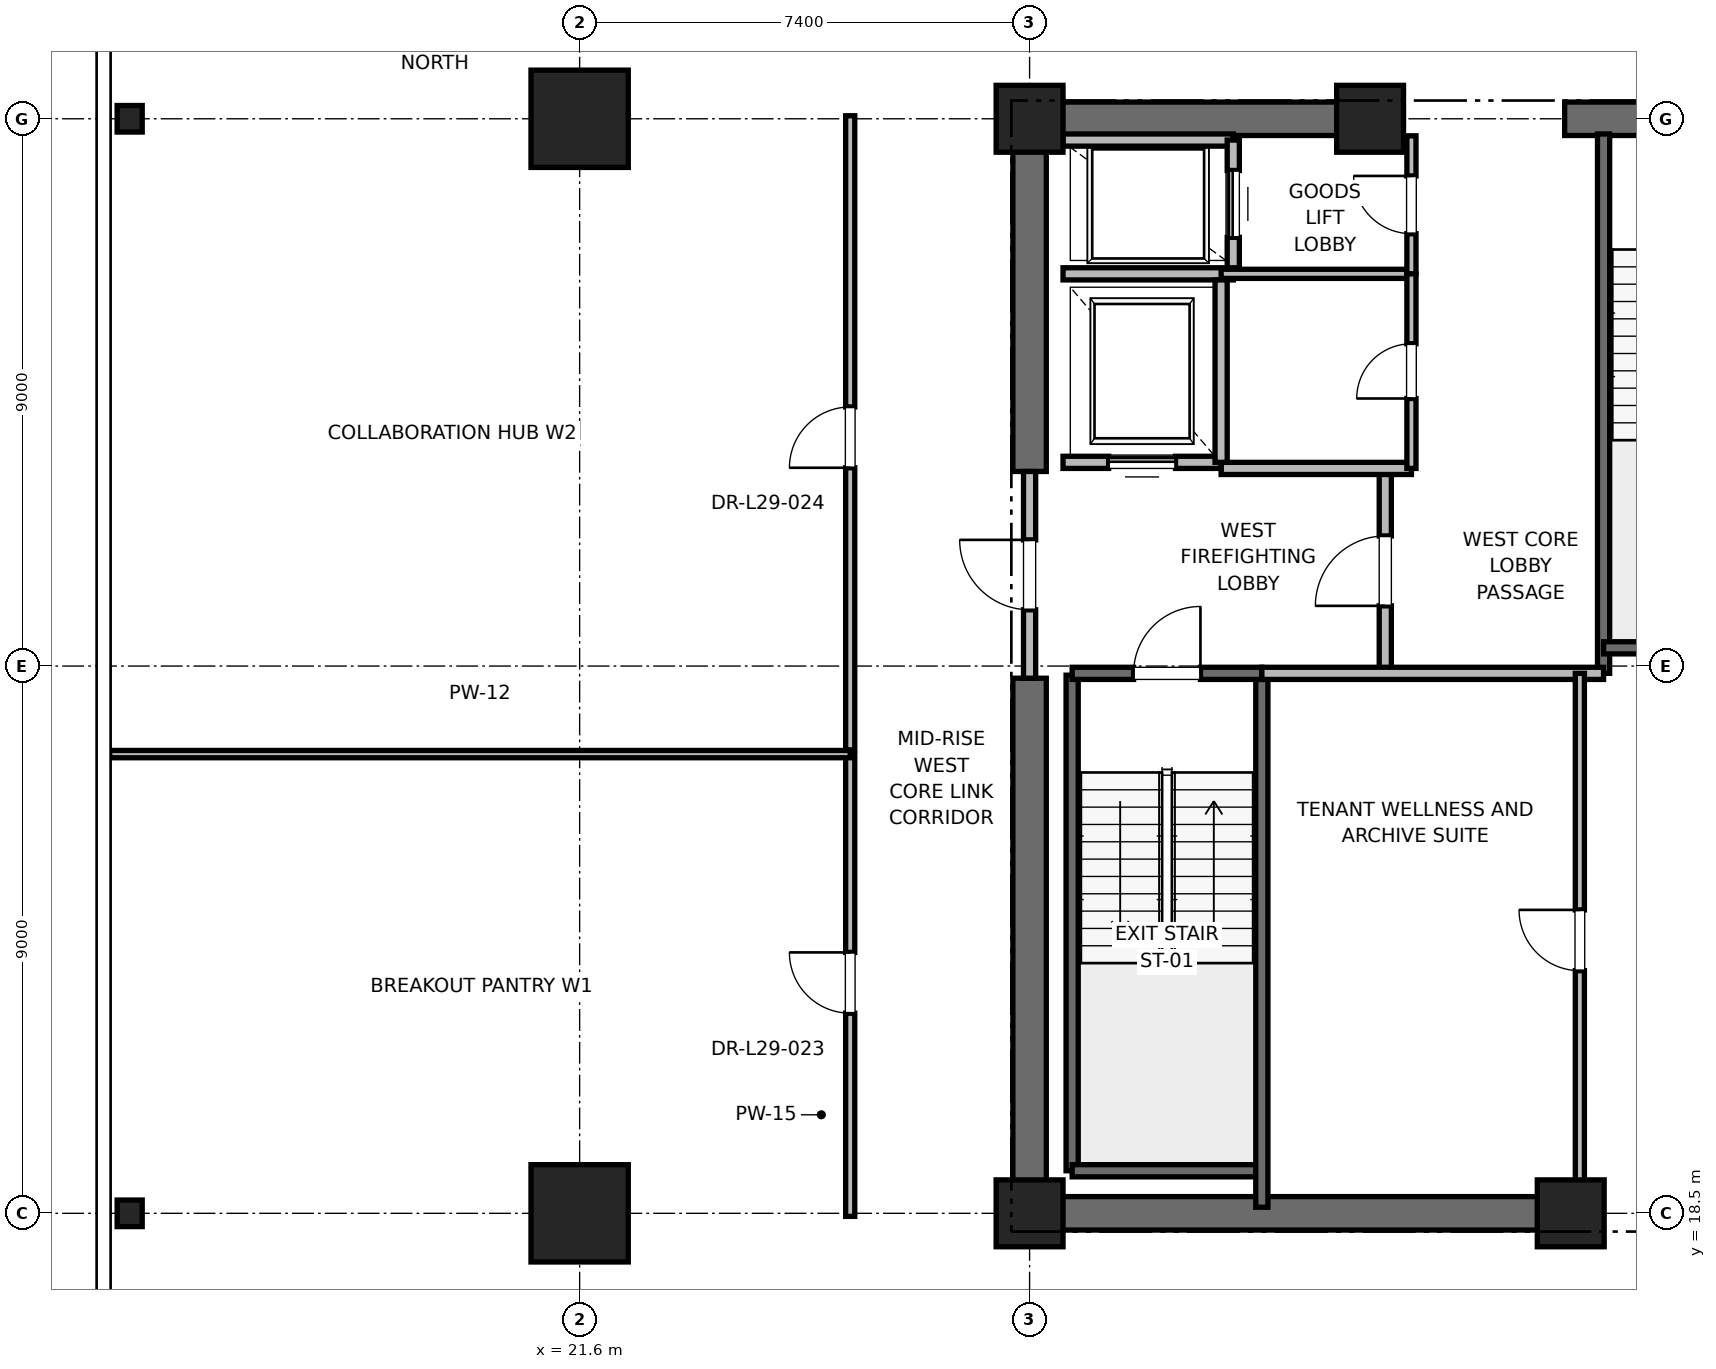
"""IFC4 building model, lengths in metres.
Left out: names, types, materials, properties, quantities, classifications, styles, units other than length and angle.
Written with IfcOpenShell. Run it as: python <this file> out.ifc"""

import sys

from ifc_helpers import new_model, si_unit, direction, frame, frame_2d, origin, origin_2d, place, context, subcontext, project, spatial, rectangle, i_section, extrude, element, fill, save


model = new_model("IFC4")
c1 = context("Model", 3, precision=1e-05, world=origin(), true_north=direction((0.0, 1.0)))
c2 = subcontext(c1, "Body", "Model", "MODEL_VIEW")
j1 = project(units=[si_unit("LENGTHUNIT", "METRE"), si_unit("PLANEANGLEUNIT", "RADIAN")], contexts=[c1])
p1 = place(None, origin())
s1 = spatial("IfcSite", under=j1, at=p1, CompositionType="ELEMENT")
p2 = place(p1, origin())
s2 = spatial("IfcBuilding", under=s1, at=p2, CompositionType="ELEMENT")
p3 = place(p2, frame((0.0, 0.0, 128.4)))
s3 = spatial("IfcBuildingStorey", under=s2, at=p3, CompositionType="ELEMENT", Elevation=128.4)
for number, where, z_axis, x_axis in (
    (1, (21.6, 18.5, 0.0), (0.0, 0.0, 1.0), (1.0, 0.0, 0.0)),
    (2, (21.6, 36.5, 0.0), (0.0, 0.0, 1.0), (1.0, 0.0, 0.0)),
):
    element("IfcColumn", number, at=place(p3, frame(where, z_axis=z_axis, x_axis=x_axis)), inside=s3, PredefinedType="COLUMN", context=c2, shape_type="SweptSolid", body=[
        extrude(rectangle(XDim=1.6, YDim=1.6, at=origin_2d()), origin(), (0.0, 0.0, 1.0), 4.0),
    ])
for number, where, z_axis, x_axis in (
    (3, (14.2, 18.5, 0.0), (0.0, 0.0, 1.0), (1.0, 0.0, 0.0)),
    (4, (14.2, 36.5, 0.0), (0.0, 0.0, 1.0), (1.0, 0.0, 0.0)),
):
    element("IfcColumn", number, at=place(p3, frame(where, z_axis=z_axis, x_axis=x_axis)), inside=s3, PredefinedType="COLUMN", context=c2, shape_type="SweptSolid", body=[
        extrude(i_section(OverallWidth=0.412, OverallDepth=0.437, WebThickness=0.036, FlangeThickness=0.058, FilletRadius=0.015, at=origin_2d()), origin(), (0.0, 0.0, 1.0), 4.0),
    ])
for number, where, z_axis, x_axis in (
    (5, (29.0, 18.5, 0.0), (0.0, 0.0, 1.0), (1.0, 0.0, 0.0)),
    (6, (29.0, 36.5, 0.0), (0.0, 0.0, 1.0), (1.0, 0.0, 0.0)),
    (7, (37.9, 18.5, 0.0), (0.0, 0.0, 1.0), (1.0, 0.0, 0.0)),
    (8, (34.6, 36.5, 0.0), (0.0, 0.0, 1.0), (1.0, 0.0, 0.0)),
):
    element("IfcColumn", number, at=place(p3, frame(where, z_axis=z_axis, x_axis=x_axis)), inside=s3, PredefinedType="PILASTER", context=c2, shape_type="SweptSolid", body=[
        extrude(rectangle(XDim=1.1, YDim=1.1, at=origin_2d()), origin(), (0.0, 0.0, 1.0), 4.0),
    ])
p4 = place(p3, frame((29.0, 18.5, 0.0), z_axis=(0.0, 0.0, 1.0), x_axis=(1.0, 0.0, 0.0)))
e9 = element("IfcWall", 9, at=p4, inside=s3, PredefinedType="SHEAR", context=c2, shape_type="SweptSolid", body=[
    extrude(rectangle(XDim=9.2, YDim=0.55, at=frame_2d((4.6, 0.0))), origin(), (0.0, 0.0, 1.0), 3.775),
])
p5 = place(p3, frame((29.0, 36.5, 0.0), z_axis=(0.0, 0.0, 1.0), x_axis=(1.0, 0.0, 0.0)))
e10 = element("IfcWall", 10, at=p5, inside=s3, PredefinedType="SHEAR", context=c2, shape_type="SweptSolid", body=[
    extrude(rectangle(XDim=5.8, YDim=0.55, at=frame_2d((2.9, 0.0))), origin(), (0.0, 0.0, 1.0), 3.775),
])
p6 = place(p3, frame((37.8, 36.5, 0.0), z_axis=(0.0, 0.0, 1.0), x_axis=(1.0, 0.0, 0.0)))
e11 = element("IfcWall", 11, at=p6, inside=s3, PredefinedType="SHEAR", context=c2, shape_type="SweptSolid", body=[
    extrude(rectangle(XDim=4.4, YDim=0.55, at=frame_2d((2.2, 0.0))), origin(), (0.0, 0.0, 1.0), 3.775),
])
p7 = place(p6, frame((1.65, 0.0, 0.0)))
e12 = element("IfcOpeningElement", 12, at=p7, cuts=e11, PredefinedType="OPENING", context=c2, shape_type="SweptSolid", body=[
    extrude(rectangle(XDim=1.1, YDim=2.15, at=frame_2d((0.55, 1.075))), frame((0.0, 0.275, 0.0), z_axis=(0.0, -1.0, 0.0), x_axis=(1.0, 0.0, 0.0)), (0.0, 0.0, 1.0), 0.55),
])
p8 = place(p3, frame((29.0, 18.5, 0.0), z_axis=(0.0, 0.0, 1.0), x_axis=(0.0, 1.0, 0.0)))
e13 = element("IfcWall", 13, at=p8, inside=s3, PredefinedType="SHEAR", context=c2, shape_type="SweptSolid", body=[
    extrude(rectangle(XDim=8.8, YDim=0.55, at=frame_2d((4.4, 0.0))), origin(), (0.0, 0.0, 1.0), 3.775),
])
p9 = place(p3, frame((29.0, 30.7, 0.0), z_axis=(0.0, 0.0, 1.0), x_axis=(0.0, 1.0, 0.0)))
e14 = element("IfcWall", 14, at=p9, inside=s3, PredefinedType="SHEAR", context=c2, shape_type="SweptSolid", body=[
    extrude(rectangle(XDim=5.8, YDim=0.55, at=frame_2d((2.9, 0.0))), origin(), (0.0, 0.0, 1.0), 3.775),
])
p10 = place(p3, frame((29.7, 19.2, 0.0), z_axis=(0.0, 0.0, 1.0), x_axis=(0.0, 1.0, 0.0)))
e15 = element("IfcWall", 15, at=p10, inside=s3, PredefinedType="SOLIDWALL", context=c2, shape_type="SweptSolid", body=[
    extrude(rectangle(XDim=8.15, YDim=0.2, at=frame_2d((4.075, 0.0))), origin(), (0.0, 0.0, 1.0), 3.775),
])
p11 = place(p3, frame((29.7, 19.2, 0.0), z_axis=(0.0, 0.0, 1.0), x_axis=(1.0, 0.0, 0.0)))
e16 = element("IfcWall", 16, at=p11, inside=s3, PredefinedType="SOLIDWALL", context=c2, shape_type="SweptSolid", body=[
    extrude(rectangle(XDim=3.12, YDim=0.2, at=frame_2d((1.56, 0.0))), origin(), (0.0, 0.0, 1.0), 3.775),
])
p12 = place(p3, frame((32.82, 18.6, 0.0), z_axis=(0.0, 0.0, 1.0), x_axis=(0.0, 1.0, 0.0)))
e17 = element("IfcWall", 17, at=p12, inside=s3, PredefinedType="SOLIDWALL", context=c2, shape_type="SweptSolid", body=[
    extrude(rectangle(XDim=8.78, YDim=0.2, at=frame_2d((4.39, 0.0))), origin(), (0.0, 0.0, 1.0), 3.775),
])
p13 = place(p3, frame((29.7, 27.38, 0.0), z_axis=(0.0, 0.0, 1.0), x_axis=(1.0, 0.0, 0.0)))
e18 = element("IfcWall", 18, at=p13, inside=s3, PredefinedType="SOLIDWALL", context=c2, shape_type="SweptSolid", body=[
    extrude(rectangle(XDim=3.12, YDim=0.2, at=frame_2d((1.56, 0.0))), origin(), (0.0, 0.0, 1.0), 3.775),
])
p14 = place(p13, frame((1.01, 0.0, 0.0)))
e19 = element("IfcOpeningElement", 19, at=p14, cuts=e18, PredefinedType="OPENING", context=c2, shape_type="SweptSolid", body=[
    extrude(rectangle(XDim=1.1, YDim=2.15, at=frame_2d((0.55, 1.075))), frame((0.0, 0.1, 0.0), z_axis=(0.0, -1.0, 0.0), x_axis=(1.0, 0.0, 0.0)), (0.0, 0.0, 1.0), 0.2),
])
p15 = place(p3, frame((38.44, 27.38, 0.0), z_axis=(0.0, 0.0, 1.0), x_axis=(0.0, 1.0, 0.0)))
e20 = element("IfcWall", 20, at=p15, inside=s3, PredefinedType="SOLIDWALL", context=c2, shape_type="SweptSolid", body=[
    extrude(rectangle(XDim=8.87, YDim=0.2, at=frame_2d((4.435, 0.0))), origin(), (0.0, 0.0, 1.0), 3.775),
])
p16 = place(p3, frame((38.44, 27.8, 0.0), z_axis=(0.0, 0.0, 1.0), x_axis=(1.0, 0.0, 0.0)))
e21 = element("IfcWall", 21, at=p16, inside=s3, PredefinedType="SOLIDWALL", context=c2, shape_type="SweptSolid", body=[
    extrude(rectangle(XDim=3.32, YDim=0.2, at=frame_2d((1.66, 0.0))), origin(), (0.0, 0.0, 1.0), 3.775),
])
p17 = place(p3, frame((34.85, 27.38, 0.0), z_axis=(0.0, 0.0, 1.0), x_axis=(0.0, 1.0, 0.0)))
e22 = element("IfcWall", 22, at=p17, inside=s3, PredefinedType="PARTITIONING", context=c2, shape_type="SweptSolid", body=[
    extrude(rectangle(XDim=3.37, YDim=0.2, at=frame_2d((1.685, 0.0))), origin(), (0.0, 0.0, 1.0), 3.775),
])
p18 = place(p17, frame((1.11, 0.0, 0.0)))
e23 = element("IfcOpeningElement", 23, at=p18, cuts=e22, PredefinedType="OPENING", context=c2, shape_type="SweptSolid", body=[
    extrude(rectangle(XDim=1.15, YDim=2.2, at=frame_2d((0.575, 1.1))), frame((0.0, 0.1, 0.0), z_axis=(0.0, -1.0, 0.0), x_axis=(1.0, 0.0, 0.0)), (0.0, 0.0, 1.0), 0.2),
])
p19 = place(p3, frame((29.0, 27.3, 0.0), z_axis=(0.0, 0.0, 1.0), x_axis=(0.0, 1.0, 0.0)))
e24 = element("IfcWall", 24, at=p19, inside=s3, PredefinedType="PARTITIONING", context=c2, shape_type="SweptSolid", body=[
    extrude(rectangle(XDim=3.4, YDim=0.2, at=frame_2d((1.7, 0.0))), origin(), (0.0, 0.0, 1.0), 2.755),
])
p20 = place(p19, frame((1.125, 0.0, 0.0)))
e25 = element("IfcOpeningElement", 25, at=p20, cuts=e24, PredefinedType="OPENING", context=c2, shape_type="SweptSolid", body=[
    extrude(rectangle(XDim=1.15, YDim=2.2, at=frame_2d((0.575, 1.1))), frame((0.0, 0.1, 0.0), z_axis=(0.0, -1.0, 0.0), x_axis=(1.0, 0.0, 0.0)), (0.0, 0.0, 1.0), 0.2),
])
p21 = place(p3, frame((32.82, 27.38, 0.0), z_axis=(0.0, 0.0, 1.0), x_axis=(1.0, 0.0, 0.0)))
e26 = element("IfcWall", 26, at=p21, inside=s3, PredefinedType="PARTITIONING", context=c2, shape_type="SweptSolid", body=[
    extrude(rectangle(XDim=5.62, YDim=0.2, at=frame_2d((2.81, 0.0))), origin(), (0.0, 0.0, 1.0), 3.775),
])
p22 = place(p3, frame((32.15, 30.75, 0.0), z_axis=(0.0, 0.0, 1.0), x_axis=(1.0, 0.0, 0.0)))
e27 = element("IfcWall", 27, at=p22, inside=s3, PredefinedType="PARTITIONING", context=c2, shape_type="SweptSolid", body=[
    extrude(rectangle(XDim=3.13, YDim=0.2, at=frame_2d((1.565, 0.0))), origin(), (0.0, 0.0, 1.0), 3.775),
])
p23 = place(p3, frame((29.55, 30.85, 0.0), z_axis=(0.0, 0.0, 1.0), x_axis=(1.0, 0.0, 0.0)))
e28 = element("IfcWall", 28, at=p23, inside=s3, PredefinedType="SOLIDWALL", context=c2, shape_type="SweptSolid", body=[
    extrude(rectangle(XDim=2.6, YDim=0.2, at=frame_2d((1.3, 0.0))), origin(), (0.0, 0.0, 1.0), 2.755),
])
p24 = place(p23, frame((0.75, 0.0, 0.0)))
e29 = element("IfcOpeningElement", 29, at=p24, cuts=e28, PredefinedType="OPENING", context=c2, shape_type="SweptSolid", body=[
    extrude(rectangle(XDim=1.1, YDim=2.2, at=frame_2d((0.55, 1.1))), frame((0.0, 0.1, 0.0), z_axis=(0.0, -1.0, 0.0), x_axis=(1.0, 0.0, 0.0)), (0.0, 0.0, 1.0), 0.2),
])
p25 = place(p3, frame((29.55, 33.95, 0.0), z_axis=(0.0, 0.0, 1.0), x_axis=(1.0, 0.0, 0.0)))
e30 = element("IfcWall", 30, at=p25, inside=s3, PredefinedType="SOLIDWALL", context=c2, shape_type="SweptSolid", body=[
    extrude(rectangle(XDim=2.8, YDim=0.2, at=frame_2d((1.4, 0.0))), origin(), (0.0, 0.0, 1.0), 3.775),
])
p26 = place(p3, frame((32.15, 30.85, 0.0), z_axis=(0.0, 0.0, 1.0), x_axis=(0.0, 1.0, 0.0)))
e31 = element("IfcWall", 31, at=p26, inside=s3, PredefinedType="SOLIDWALL", context=c2, shape_type="SweptSolid", body=[
    extrude(rectangle(XDim=3.0, YDim=0.2, at=frame_2d((1.5, 0.0))), origin(), (0.0, 0.0, 1.0), 3.775),
])
p27 = place(p3, frame((32.35, 36.15, 0.0), z_axis=(0.0, 0.0, 1.0), x_axis=(-1.0, 0.0, 0.0)))
e32 = element("IfcWall", 32, at=p27, inside=s3, PredefinedType="SOLIDWALL", context=c2, shape_type="SweptSolid", body=[
    extrude(rectangle(XDim=2.8, YDim=0.2, at=frame_2d((1.4, 0.0))), origin(), (0.0, 0.0, 1.0), 2.985),
])
p28 = place(p3, frame((32.35, 34.05, 0.0), z_axis=(0.0, 0.0, 1.0), x_axis=(0.0, 1.0, 0.0)))
e33 = element("IfcWall", 33, at=p28, inside=s3, PredefinedType="SOLIDWALL", context=c2, shape_type="SweptSolid", body=[
    extrude(rectangle(XDim=2.1, YDim=0.2, at=frame_2d((1.05, 0.0))), origin(), (0.0, 0.0, 1.0), 3.775),
])
p29 = place(p28, frame((0.5, 0.0, 0.0)))
e34 = element("IfcOpeningElement", 34, at=p29, cuts=e33, PredefinedType="OPENING", context=c2, shape_type="SweptSolid", body=[
    extrude(rectangle(XDim=1.1, YDim=2.2, at=frame_2d((0.55, 1.1))), frame((0.0, 0.1, 0.0), z_axis=(0.0, -1.0, 0.0), x_axis=(1.0, 0.0, 0.0)), (0.0, 0.0, 1.0), 0.2),
])
p30 = place(p3, frame((32.15, 33.95, 0.0), z_axis=(0.0, 0.0, 1.0), x_axis=(1.0, 0.0, 0.0)))
e35 = element("IfcWall", 35, at=p30, inside=s3, PredefinedType="PARTITIONING", context=c2, shape_type="SweptSolid", body=[
    extrude(rectangle(XDim=3.13, YDim=0.15, at=frame_2d((1.565, 0.0))), origin(), (0.0, 0.0, 1.0), 2.85),
])
p31 = place(p3, frame((35.28, 33.95, 0.0), z_axis=(0.0, 0.0, 1.0), x_axis=(0.0, 1.0, 0.0)))
e36 = element("IfcWall", 36, at=p31, inside=s3, PredefinedType="PARTITIONING", context=c2, shape_type="SweptSolid", body=[
    extrude(rectangle(XDim=2.27, YDim=0.15, at=frame_2d((1.135, 0.0))), origin(), (0.0, 0.0, 1.0), 2.755),
])
p32 = place(p31, frame((0.66, 0.0, 0.0)))
e37 = element("IfcOpeningElement", 37, at=p32, cuts=e36, PredefinedType="OPENING", context=c2, shape_type="SweptSolid", body=[
    extrude(rectangle(XDim=0.95, YDim=2.15, at=frame_2d((0.475, 1.075))), frame((0.0, 0.075, 0.0), z_axis=(0.0, -1.0, 0.0), x_axis=(1.0, 0.0, 0.0)), (0.0, 0.0, 1.0), 0.15),
])
p33 = place(p3, frame((35.28, 30.75, 0.0), z_axis=(0.0, 0.0, 1.0), x_axis=(0.0, 1.0, 0.0)))
e38 = element("IfcWall", 38, at=p33, inside=s3, PredefinedType="PARTITIONING", context=c2, shape_type="SweptSolid", body=[
    extrude(rectangle(XDim=3.2, YDim=0.15, at=frame_2d((1.6, 0.0))), origin(), (0.0, 0.0, 1.0), 2.85),
])
p34 = place(p33, frame((1.15, 0.0, 0.0)))
e39 = element("IfcOpeningElement", 39, at=p34, cuts=e38, PredefinedType="OPENING", context=c2, shape_type="SweptSolid", body=[
    extrude(rectangle(XDim=0.9, YDim=2.1, at=frame_2d((0.45, 1.05))), frame((0.0, 0.075, 0.0), z_axis=(0.0, -1.0, 0.0), x_axis=(1.0, 0.0, 0.0)), (0.0, 0.0, 1.0), 0.15),
])
p35 = place(p3, frame((38.05, 18.6, 0.0), z_axis=(0.0, 0.0, 1.0), x_axis=(0.0, 1.0, 0.0)))
e40 = element("IfcWall", 40, at=p35, inside=s3, PredefinedType="PARTITIONING", context=c2, shape_type="SweptSolid", body=[
    extrude(rectangle(XDim=8.78, YDim=0.15, at=frame_2d((4.39, 0.0))), origin(), (0.0, 0.0, 1.0), 2.755),
])
p36 = place(p35, frame((3.89, 0.0, 0.0)))
e41 = element("IfcOpeningElement", 41, at=p36, cuts=e40, PredefinedType="OPENING", context=c2, shape_type="SweptSolid", body=[
    extrude(rectangle(XDim=1.0, YDim=2.15, at=frame_2d((0.5, 1.075))), frame((0.0, 0.075, 0.0), z_axis=(0.0, -1.0, 0.0), x_axis=(1.0, 0.0, 0.0)), (0.0, 0.0, 1.0), 0.15),
])
p37 = place(p3, frame((26.05, 18.45, 0.0), z_axis=(0.0, 0.0, 1.0), x_axis=(0.0, 1.0, 0.0)))
e42 = element("IfcWall", 42, at=p37, inside=s3, PredefinedType="PARTITIONING", context=c2, shape_type="SweptSolid", body=[
    extrude(rectangle(XDim=7.602, YDim=0.15, at=frame_2d((3.801, 0.0))), origin(), (0.0, 0.0, 1.0), 2.85),
])
p38 = place(p37, frame((3.341, 0.0, 0.0)))
e43 = element("IfcOpeningElement", 43, at=p38, cuts=e42, PredefinedType="OPENING", context=c2, shape_type="SweptSolid", body=[
    extrude(rectangle(XDim=1.0, YDim=2.15, at=frame_2d((0.5, 1.075))), frame((0.0, 0.075, 0.0), z_axis=(0.0, -1.0, 0.0), x_axis=(1.0, 0.0, 0.0)), (0.0, 0.0, 1.0), 0.15),
])
p39 = place(p3, frame((13.871, 26.052, 0.0), z_axis=(0.0, 0.0, 1.0), x_axis=(1.0, 0.0, 0.0)))
e44 = element("IfcWall", 44, at=p39, inside=s3, PredefinedType="PARTITIONING", context=c2, shape_type="SweptSolid", body=[
    extrude(rectangle(XDim=12.179, YDim=0.12, at=frame_2d((6.089, 0.0))), origin(), (0.0, 0.0, 1.0), 2.85),
])
p40 = place(p3, frame((26.05, 26.122, 0.0), z_axis=(0.0, 0.0, 1.0), x_axis=(0.0, 1.0, 0.0)))
e45 = element("IfcWall", 45, at=p40, inside=s3, PredefinedType="PARTITIONING", context=c2, shape_type="SweptSolid", body=[
    extrude(rectangle(XDim=10.428, YDim=0.15, at=frame_2d((5.214, 0.0))), origin(), (0.0, 0.0, 1.0), 2.85),
])
p41 = place(p40, frame((4.639, 0.0, 0.0)))
e46 = element("IfcOpeningElement", 46, at=p41, cuts=e45, PredefinedType="OPENING", context=c2, shape_type="SweptSolid", body=[
    extrude(rectangle(XDim=1.0, YDim=2.15, at=frame_2d((0.5, 1.075))), frame((0.0, 0.075, 0.0), z_axis=(0.0, -1.0, 0.0), x_axis=(1.0, 0.0, 0.0)), (0.0, 0.0, 1.0), 0.15),
])
p42 = place(p14, origin())
e47 = element("IfcDoor", 47, at=p42, inside=s3, OperationType="SINGLE_SWING_RIGHT", PredefinedType="DOOR", context=c2, shape_type="SweptSolid", body=[
    extrude(rectangle(XDim=1.1, YDim=2.15, at=frame_2d((0.55, 1.075))), frame((0.0, 0.025, 0.0), z_axis=(0.0, -1.0, 0.0), x_axis=(1.0, 0.0, 0.0)), (0.0, 0.0, 1.0), 0.05),
])
fill(e19, e47)
p43 = place(p18, origin())
e48 = element("IfcDoor", 48, at=p43, inside=s3, OperationType="SINGLE_SWING_LEFT", PredefinedType="DOOR", context=c2, shape_type="SweptSolid", body=[
    extrude(rectangle(XDim=1.15, YDim=2.2, at=frame_2d((0.575, 1.1))), frame((0.0, 0.025, 0.0), z_axis=(0.0, -1.0, 0.0), x_axis=(1.0, 0.0, 0.0)), (0.0, 0.0, 1.0), 0.05),
])
fill(e23, e48)
p44 = place(p20, origin())
e49 = element("IfcDoor", 49, at=p44, inside=s3, OperationType="SINGLE_SWING_RIGHT", PredefinedType="DOOR", context=c2, shape_type="SweptSolid", body=[
    extrude(rectangle(XDim=1.15, YDim=2.2, at=frame_2d((0.575, 1.1))), frame((0.0, 0.025, 0.0), z_axis=(0.0, -1.0, 0.0), x_axis=(1.0, 0.0, 0.0)), (0.0, 0.0, 1.0), 0.05),
])
fill(e25, e49)
p45 = place(p24, origin())
e50 = element("IfcDoor", 50, at=p45, inside=s3, OperationType="SLIDING_TO_RIGHT", PredefinedType="DOOR", context=c2, shape_type="SweptSolid", body=[
    extrude(rectangle(XDim=1.1, YDim=2.2, at=frame_2d((0.55, 1.1))), frame((0.0, 0.025, 0.0), z_axis=(0.0, -1.0, 0.0), x_axis=(1.0, 0.0, 0.0)), (0.0, 0.0, 1.0), 0.05),
])
fill(e29, e50)
p46 = place(p29, origin())
e51 = element("IfcDoor", 51, at=p46, inside=s3, OperationType="SLIDING_TO_RIGHT", PredefinedType="DOOR", context=c2, shape_type="SweptSolid", body=[
    extrude(rectangle(XDim=1.1, YDim=2.2, at=frame_2d((0.55, 1.1))), frame((0.0, 0.025, 0.0), z_axis=(0.0, -1.0, 0.0), x_axis=(1.0, 0.0, 0.0)), (0.0, 0.0, 1.0), 0.05),
])
fill(e34, e51)
p47 = place(p32, origin())
e52 = element("IfcDoor", 52, at=p47, inside=s3, OperationType="SINGLE_SWING_RIGHT", PredefinedType="DOOR", context=c2, shape_type="SweptSolid", body=[
    extrude(rectangle(XDim=0.95, YDim=2.15, at=frame_2d((0.475, 1.075))), frame((0.0, 0.025, 0.0), z_axis=(0.0, -1.0, 0.0), x_axis=(1.0, 0.0, 0.0)), (0.0, 0.0, 1.0), 0.05),
])
fill(e37, e52)
p48 = place(p34, origin())
e53 = element("IfcDoor", 53, at=p48, inside=s3, OperationType="SINGLE_SWING_LEFT", PredefinedType="DOOR", context=c2, shape_type="SweptSolid", body=[
    extrude(rectangle(XDim=0.9, YDim=2.1, at=frame_2d((0.45, 1.05))), frame((0.0, 0.025, 0.0), z_axis=(0.0, -1.0, 0.0), x_axis=(1.0, 0.0, 0.0)), (0.0, 0.0, 1.0), 0.05),
])
fill(e39, e53)
p49 = place(p36, origin())
e54 = element("IfcDoor", 54, at=p49, inside=s3, OperationType="SINGLE_SWING_RIGHT", PredefinedType="DOOR", context=c2, shape_type="SweptSolid", body=[
    extrude(rectangle(XDim=1.0, YDim=2.15, at=frame_2d((0.5, 1.075))), frame((0.0, 0.025, 0.0), z_axis=(0.0, -1.0, 0.0), x_axis=(1.0, 0.0, 0.0)), (0.0, 0.0, 1.0), 0.05),
])
fill(e41, e54)
p50 = place(p38, origin())
e55 = element("IfcDoor", 55, at=p50, inside=s3, OperationType="SINGLE_SWING_RIGHT", PredefinedType="DOOR", context=c2, shape_type="SweptSolid", body=[
    extrude(rectangle(XDim=1.0, YDim=2.15, at=frame_2d((0.5, 1.075))), frame((0.0, 0.025, 0.0), z_axis=(0.0, -1.0, 0.0), x_axis=(1.0, 0.0, 0.0)), (0.0, 0.0, 1.0), 0.05),
])
fill(e43, e55)
p51 = place(p41, origin())
e56 = element("IfcDoor", 56, at=p51, inside=s3, OperationType="SINGLE_SWING_LEFT", PredefinedType="DOOR", context=c2, shape_type="SweptSolid", body=[
    extrude(rectangle(XDim=1.0, YDim=2.15, at=frame_2d((0.5, 1.075))), frame((0.0, 0.025, 0.0), z_axis=(0.0, -1.0, 0.0), x_axis=(1.0, 0.0, 0.0)), (0.0, 0.0, 1.0), 0.05),
])
fill(e46, e56)
save(model, sys.argv[1])
